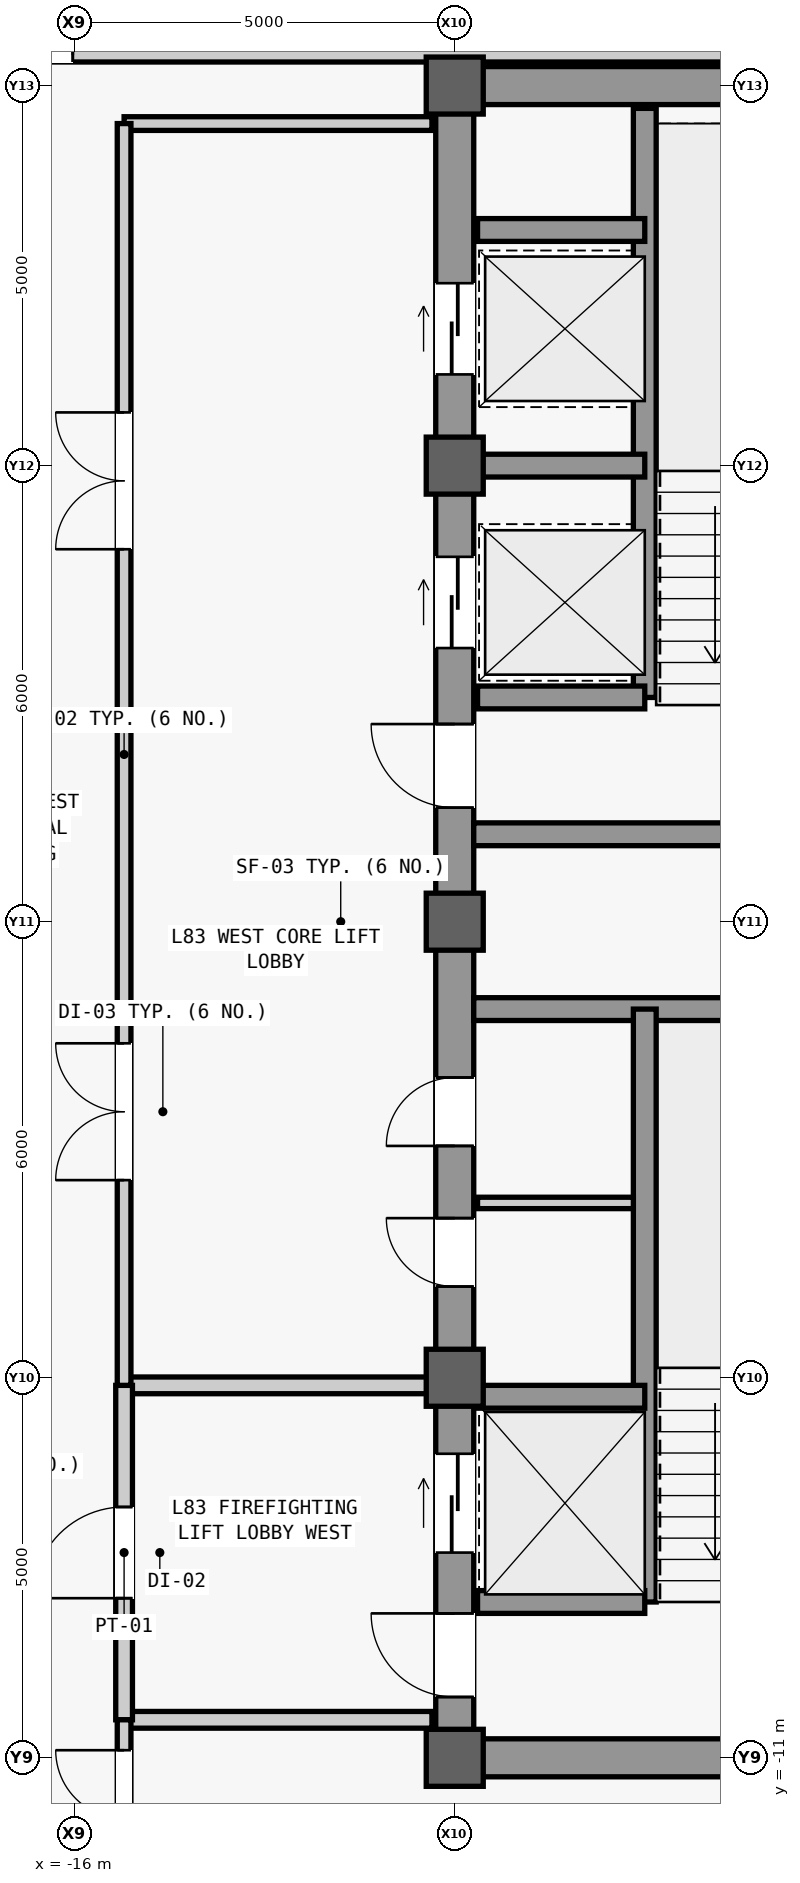
"""IFC4 building model, lengths in metres.
Left out: names, types, materials, properties, quantities, classifications, styles, units other than length and angle.
Written with IfcOpenShell. Run it as: python <this file> out.ifc"""

import sys

from ifc_helpers import new_model, si_unit, direction, frame, frame_2d, origin, origin_2d, place, context, subcontext, project, spatial, rectangle, extrude, source, transform, mapped, element, fill, save


model = new_model("IFC4")
c1 = context("Model", 3, precision=1e-05, world=origin(), true_north=direction((0.0, 1.0)))
c2 = subcontext(c1, "Body", "Model", "MODEL_VIEW")
j1 = project(units=[si_unit("LENGTHUNIT", "METRE"), si_unit("PLANEANGLEUNIT", "RADIAN")], contexts=[c1])
p1 = place(None, origin())
s1 = spatial("IfcSite", under=j1, at=p1, CompositionType="ELEMENT")
p2 = place(p1, origin())
s2 = spatial("IfcBuilding", under=s1, at=p2, CompositionType="ELEMENT")
p3 = place(p2, frame((0.0, 0.0, 350.3)))
s3 = spatial("IfcBuildingStorey", under=s2, at=p3, CompositionType="ELEMENT", Elevation=350.3)
m1 = source(origin(), c2, "Body", "SweptSolid", [
    extrude(rectangle(XDim=22.0, YDim=0.5, at=frame_2d((11.0, 0.0))), origin(), (0.0, 0.0, 1.0), 3.74),
])
p4 = place(p3, frame((-11.0, -11.0, 0.0), z_axis=(0.0, 0.0, 1.0), x_axis=(0.0, 1.0, 0.0)))
e1 = element("IfcWall", 1, at=p4, inside=s3, PredefinedType="SHEAR", context=c2, shape_type="MappedRepresentation", body=[
    mapped(m1, transform((0.0, 0.0, 0.0), scale=1.0)),
])
m2 = source(origin(), c2, "Body", "SweptSolid", [
    extrude(rectangle(XDim=1.1, YDim=2.2, at=frame_2d((0.55, 1.1))), frame((0.0, 0.26, 0.0), z_axis=(0.0, -1.0, 0.0), x_axis=(1.0, 0.0, 0.0)), (0.0, 0.0, 1.0), 0.52),
])
p5 = place(p4, frame((0.8, 0.0, 0.0)))
e2 = element("IfcOpeningElement", 2, at=p5, cuts=e1, PredefinedType="OPENING", context=c2, shape_type="MappedRepresentation", body=[
    mapped(m2, transform((0.0, 0.0, 0.0), scale=1.0)),
])
p6 = place(p4, frame((12.5, 0.0, 0.0)))
e3 = element("IfcOpeningElement", 3, at=p6, cuts=e1, PredefinedType="OPENING", context=c2, shape_type="MappedRepresentation", body=[
    mapped(m2, transform((0.0, 0.0, 0.0), scale=1.0)),
])
m3 = source(origin(), c2, "Body", "SweptSolid", [
    extrude(rectangle(XDim=0.9, YDim=2.15, at=frame_2d((0.45, 1.075))), frame((0.0, 0.26, 0.0), z_axis=(0.0, -1.0, 0.0), x_axis=(1.0, 0.0, 0.0)), (0.0, 0.0, 1.0), 0.52),
])
p7 = place(p4, frame((6.2, 0.0, 0.0)))
e4 = element("IfcOpeningElement", 4, at=p7, cuts=e1, PredefinedType="OPENING", context=c2, shape_type="MappedRepresentation", body=[
    mapped(m3, transform((0.0, 0.0, 0.0), scale=1.0)),
])
p8 = place(p4, frame((8.05, 0.0, 0.0)))
e5 = element("IfcOpeningElement", 5, at=p8, cuts=e1, PredefinedType="OPENING", context=c2, shape_type="MappedRepresentation", body=[
    mapped(m3, transform((0.0, 0.0, 0.0), scale=1.0)),
])
m4 = source(origin(), c2, "Body", "SweptSolid", [
    extrude(rectangle(XDim=1.2, YDim=2.3, at=frame_2d((0.6, 1.15))), frame((0.0, 0.26, 0.0), z_axis=(0.0, -1.0, 0.0), x_axis=(1.0, 0.0, 0.0)), (0.0, 0.0, 1.0), 0.52),
])
p9 = place(p4, frame((14.6, 0.0, 0.0)))
e6 = element("IfcOpeningElement", 6, at=p9, cuts=e1, PredefinedType="OPENING", context=c2, shape_type="MappedRepresentation", body=[
    mapped(m4, transform((0.0, 0.0, 0.0), scale=1.0)),
])
p10 = place(p4, frame((18.2, 0.0, 0.0)))
e7 = element("IfcOpeningElement", 7, at=p10, cuts=e1, PredefinedType="OPENING", context=c2, shape_type="MappedRepresentation", body=[
    mapped(m4, transform((0.0, 0.0, 0.0), scale=1.0)),
])
m5 = source(origin(), c2, "Body", "SweptSolid", [
    extrude(rectangle(XDim=1.3, YDim=2.3, at=frame_2d((0.65, 1.15))), frame((0.0, 0.26, 0.0), z_axis=(0.0, -1.0, 0.0), x_axis=(1.0, 0.0, 0.0)), (0.0, 0.0, 1.0), 0.52),
])
p11 = place(p4, frame((2.7, 0.0, 0.0)))
e8 = element("IfcOpeningElement", 8, at=p11, cuts=e1, PredefinedType="OPENING", context=c2, shape_type="MappedRepresentation", body=[
    mapped(m5, transform((0.0, 0.0, 0.0), scale=1.0)),
])
m6 = source(origin(), c2, "Body", "SweptSolid", [
    extrude(rectangle(XDim=5.9, YDim=0.5, at=frame_2d((2.95, 0.0))), origin(), (0.0, 0.0, 1.0), 3.74),
])
for number, where, z_axis, x_axis in (
    (9, (-10.75, -11.0, 0.0), (0.0, 0.0, 1.0), (1.0, 0.0, 0.0)),
    (10, (-10.75, 11.0, 0.0), (0.0, 0.0, 1.0), (1.0, 0.0, 0.0)),
):
    element("IfcWall", number, at=place(p3, frame(where, z_axis=z_axis, x_axis=x_axis)), inside=s3, PredefinedType="SHEAR", context=c2, shape_type="MappedRepresentation", body=[
        mapped(m6, transform((0.0, 0.0, 0.0), scale=1.0)),
    ])
m7 = source(origin(), c2, "Body", "SweptSolid", [
    extrude(rectangle(XDim=5.65, YDim=0.3, at=frame_2d((2.825, 0.0))), origin(), (0.0, 0.0, 1.0), 3.74),
])
for number, where, z_axis, x_axis in (
    (11, (-10.75, -1.15, 0.0), (0.0, 0.0, 1.0), (1.0, 0.0, 0.0)),
    (12, (-10.75, 1.15, 0.0), (0.0, 0.0, 1.0), (1.0, 0.0, 0.0)),
):
    element("IfcWall", number, at=place(p3, frame(where, z_axis=z_axis, x_axis=x_axis)), inside=s3, PredefinedType="SHEAR", context=c2, shape_type="MappedRepresentation", body=[
        mapped(m7, transform((0.0, 0.0, 0.0), scale=1.0)),
    ])
m8 = source(origin(), c2, "Body", "SweptSolid", [
    extrude(rectangle(XDim=0.75, YDim=0.75, at=origin_2d()), origin(), (0.0, 0.0, 1.0), 4.0),
])
for number, where, z_axis, x_axis in (
    (13, (-11.0, -11.0, 0.0), (0.0, 0.0, 1.0), (1.0, 0.0, 0.0)),
    (14, (-11.0, -6.0, 0.0), (0.0, 0.0, 1.0), (1.0, 0.0, 0.0)),
    (15, (-11.0, 0.0, 0.0), (0.0, 0.0, 1.0), (1.0, 0.0, 0.0)),
    (16, (-11.0, 6.0, 0.0), (0.0, 0.0, 1.0), (1.0, 0.0, 0.0)),
    (17, (-11.0, 11.0, 0.0), (0.0, 0.0, 1.0), (1.0, 0.0, 0.0)),
):
    element("IfcColumn", number, at=place(p3, frame(where, z_axis=z_axis, x_axis=x_axis)), inside=s3, PredefinedType="COLUMN", context=c2, shape_type="MappedRepresentation", body=[
        mapped(m8, transform((0.0, 0.0, 0.0), scale=1.0)),
    ])
m9 = source(origin(), c2, "Body", "SweptSolid", [
    extrude(rectangle(XDim=7.8, YDim=0.3, at=frame_2d((3.9, 0.0))), origin(), (0.0, 0.0, 1.0), 3.74),
])
p12 = place(p3, frame((-8.5, -8.95, 0.0), z_axis=(0.0, 0.0, 1.0), x_axis=(0.0, 1.0, 0.0)))
e18 = element("IfcWall", 18, at=p12, inside=s3, PredefinedType="SHEAR", context=c2, shape_type="MappedRepresentation", body=[
    mapped(m9, transform((0.0, 0.0, 0.0), scale=1.0)),
])
m10 = source(origin(), c2, "Body", "SweptSolid", [
    extrude(rectangle(XDim=2.2, YDim=0.3, at=frame_2d((1.1, 0.0))), origin(), (0.0, 0.0, 1.0), 3.74),
])
for number, where, z_axis, x_axis in (
    (19, (-10.7, -8.95, 0.0), (0.0, 0.0, 1.0), (1.0, 0.0, 0.0)),
    (20, (-10.7, -6.25, 0.0), (0.0, 0.0, 1.0), (1.0, 0.0, 0.0)),
):
    element("IfcWall", number, at=place(p3, frame(where, z_axis=z_axis, x_axis=x_axis)), inside=s3, PredefinedType="SHEAR", context=c2, shape_type="MappedRepresentation", body=[
        mapped(m10, transform((0.0, 0.0, 0.0), scale=1.0)),
    ])
m11 = source(origin(), c2, "Body", "SweptSolid", [
    extrude(rectangle(XDim=7.75, YDim=0.3, at=frame_2d((3.875, 0.0))), origin(), (0.0, 0.0, 1.0), 3.74),
])
p13 = place(p3, frame((-8.5, 2.95, 0.0), z_axis=(0.0, 0.0, 1.0), x_axis=(0.0, 1.0, 0.0)))
e21 = element("IfcWall", 21, at=p13, inside=s3, PredefinedType="SHEAR", context=c2, shape_type="MappedRepresentation", body=[
    mapped(m11, transform((0.0, 0.0, 0.0), scale=1.0)),
])
for number, where, z_axis, x_axis in (
    (22, (-10.7, 2.95, 0.0), (0.0, 0.0, 1.0), (1.0, 0.0, 0.0)),
    (23, (-10.7, 6.0, 0.0), (0.0, 0.0, 1.0), (1.0, 0.0, 0.0)),
    (24, (-10.7, 9.1, 0.0), (0.0, 0.0, 1.0), (1.0, 0.0, 0.0)),
):
    element("IfcWall", number, at=place(p3, frame(where, z_axis=z_axis, x_axis=x_axis)), inside=s3, PredefinedType="SHEAR", context=c2, shape_type="MappedRepresentation", body=[
        mapped(m10, transform((0.0, 0.0, 0.0), scale=1.0)),
    ])
m12 = source(origin(), c2, "Body", "SweptSolid", [
    extrude(rectangle(XDim=2.05, YDim=0.15, at=frame_2d((1.025, 0.0))), origin(), (0.0, 0.0, 1.0), 3.74),
])
p14 = place(p3, frame((-10.7, -3.7, 0.0), z_axis=(0.0, 0.0, 1.0), x_axis=(1.0, 0.0, 0.0)))
e25 = element("IfcWall", 25, at=p14, inside=s3, PredefinedType="PARTITIONING", context=c2, shape_type="MappedRepresentation", body=[
    mapped(m12, transform((0.0, 0.0, 0.0), scale=1.0)),
])
m13 = source(origin(), c2, "Body", "SweptSolid", [
    extrude(rectangle(XDim=4.05, YDim=0.22, at=frame_2d((2.025, 0.0))), origin(), (0.0, 0.0, 1.0), 3.74),
])
p15 = place(p3, frame((-15.35, -10.5, 0.0), z_axis=(0.0, 0.0, 1.0), x_axis=(1.0, 0.0, 0.0)))
e26 = element("IfcWall", 26, at=p15, inside=s3, PredefinedType="PARTITIONING", context=c2, shape_type="MappedRepresentation", body=[
    mapped(m13, transform((0.0, 0.0, 0.0), scale=1.0)),
])
m14 = source(origin(), c2, "Body", "SweptSolid", [
    extrude(rectangle(XDim=4.05, YDim=0.22, at=frame_2d((2.025, 0.0))), origin(), (0.0, 0.0, 1.0), 3.124),
])
p16 = place(p3, frame((-15.35, -6.1, 0.0), z_axis=(0.0, 0.0, 1.0), x_axis=(1.0, 0.0, 0.0)))
e27 = element("IfcWall", 27, at=p16, inside=s3, PredefinedType="PARTITIONING", context=c2, shape_type="MappedRepresentation", body=[
    mapped(m14, transform((0.0, 0.0, 0.0), scale=1.0)),
])
m15 = source(origin(), c2, "Body", "SweptSolid", [
    extrude(rectangle(XDim=4.4, YDim=0.22, at=frame_2d((2.2, 0.0))), origin(), (0.0, 0.0, 1.0), 3.74),
])
p17 = place(p3, frame((-15.35, -10.5, 0.0), z_axis=(0.0, 0.0, 1.0), x_axis=(0.0, 1.0, 0.0)))
e28 = element("IfcWall", 28, at=p17, inside=s3, PredefinedType="PARTITIONING", context=c2, shape_type="MappedRepresentation", body=[
    mapped(m15, transform((0.0, 0.0, 0.0), scale=1.0)),
])
m16 = source(origin(), c2, "Body", "SweptSolid", [
    extrude(rectangle(XDim=1.2, YDim=2.2, at=frame_2d((0.6, 1.1))), frame((0.0, 0.12, 0.0), z_axis=(0.0, -1.0, 0.0), x_axis=(1.0, 0.0, 0.0)), (0.0, 0.0, 1.0), 0.24),
])
p18 = place(p17, frame((1.6, 0.0, 0.0)))
e29 = element("IfcOpeningElement", 29, at=p18, cuts=e28, PredefinedType="OPENING", context=c2, shape_type="MappedRepresentation", body=[
    mapped(m16, transform((0.0, 0.0, 0.0), scale=1.0)),
])
m17 = source(origin(), c2, "Body", "SweptSolid", [
    extrude(rectangle(XDim=4.05, YDim=0.18, at=frame_2d((2.025, 0.0))), origin(), (0.0, 0.0, 1.0), 3.74),
])
p19 = place(p3, frame((-15.35, 10.5, 0.0), z_axis=(0.0, 0.0, 1.0), x_axis=(1.0, 0.0, 0.0)))
e30 = element("IfcWall", 30, at=p19, inside=s3, PredefinedType="PARTITIONING", context=c2, shape_type="MappedRepresentation", body=[
    mapped(m17, transform((0.0, 0.0, 0.0), scale=1.0)),
])
m18 = source(origin(), c2, "Body", "SweptSolid", [
    extrude(rectangle(XDim=16.6, YDim=0.18, at=frame_2d((8.3, 0.0))), origin(), (0.0, 0.0, 1.0), 3.74),
])
p20 = place(p3, frame((-15.35, -6.1, 0.0), z_axis=(0.0, 0.0, 1.0), x_axis=(0.0, 1.0, 0.0)))
e31 = element("IfcWall", 31, at=p20, inside=s3, PredefinedType="PARTITIONING", context=c2, shape_type="MappedRepresentation", body=[
    mapped(m18, transform((0.0, 0.0, 0.0), scale=1.0)),
])
m19 = source(origin(), c2, "Body", "SweptSolid", [
    extrude(rectangle(XDim=1.8, YDim=2.25, at=frame_2d((0.9, 1.125))), frame((0.0, 0.1, 0.0), z_axis=(0.0, -1.0, 0.0), x_axis=(1.0, 0.0, 0.0)), (0.0, 0.0, 1.0), 0.2),
])
p21 = place(p20, frame((2.7, 0.0, 0.0)))
e32 = element("IfcOpeningElement", 32, at=p21, cuts=e31, PredefinedType="OPENING", context=c2, shape_type="MappedRepresentation", body=[
    mapped(m19, transform((0.0, 0.0, 0.0), scale=1.0)),
])
p22 = place(p20, frame((11.0, 0.0, 0.0)))
e33 = element("IfcOpeningElement", 33, at=p22, cuts=e31, PredefinedType="OPENING", context=c2, shape_type="MappedRepresentation", body=[
    mapped(m19, transform((0.0, 0.0, 0.0), scale=1.0)),
])
m20 = source(origin(), c2, "Body", "SweptSolid", [
    extrude(rectangle(XDim=2.6, YDim=0.18, at=frame_2d((1.3, 0.0))), origin(), (0.0, 0.0, 1.0), 3.74),
])
p23 = place(p3, frame((-15.35, -13.1, 0.0), z_axis=(0.0, 0.0, 1.0), x_axis=(0.0, 1.0, 0.0)))
e34 = element("IfcWall", 34, at=p23, inside=s3, PredefinedType="PARTITIONING", context=c2, shape_type="MappedRepresentation", body=[
    mapped(m20, transform((0.0, 0.0, 0.0), scale=1.0)),
])
p24 = place(p23, frame((0.4, 0.0, 0.0)))
e35 = element("IfcOpeningElement", 35, at=p24, cuts=e34, PredefinedType="OPENING", context=c2, shape_type="MappedRepresentation", body=[
    mapped(m19, transform((0.0, 0.0, 0.0), scale=1.0)),
])
m21 = source(origin(), c2, "Body", "SweptSolid", [
    extrude(rectangle(XDim=12.7, YDim=0.18, at=frame_2d((6.35, 0.0))), origin(), (0.0, 0.0, 1.0), 2.79),
])
p25 = place(p3, frame((-17.75, 11.4, 0.0), z_axis=(0.0, 0.0, 1.0), x_axis=(1.0, 0.0, 0.0)))
e36 = element("IfcWall", 36, at=p25, inside=s3, PredefinedType="PARTITIONING", context=c2, shape_type="MappedRepresentation", body=[
    mapped(m21, transform((0.0, 0.0, 0.0), scale=1.0)),
])
m22 = source(origin(), c2, "Body", "SweptSolid", [
    extrude(rectangle(XDim=1.05, YDim=2.2, at=frame_2d((0.525, 1.1))), frame((0.0, 0.1, 0.0), z_axis=(0.0, -1.0, 0.0), x_axis=(1.0, 0.0, 0.0)), (0.0, 0.0, 1.0), 0.2),
])
p26 = place(p25, frame((0.675, 0.0, 0.0)))
e37 = element("IfcOpeningElement", 37, at=p26, cuts=e36, PredefinedType="OPENING", context=c2, shape_type="MappedRepresentation", body=[
    mapped(m22, transform((0.0, 0.0, 0.0), scale=1.0)),
])
m23 = source(origin(), c2, "Body", "SweptSolid", [
    extrude(rectangle(XDim=1.1, YDim=2.2, at=frame_2d((0.55, 1.1))), frame((0.0, 0.025, 0.0), z_axis=(0.0, -1.0, 0.0), x_axis=(1.0, 0.0, 0.0)), (0.0, 0.0, 1.0), 0.05),
])
p27 = place(p5, origin())
e38 = element("IfcDoor", 38, at=p27, inside=s3, OperationType="SINGLE_SWING_RIGHT", PredefinedType="DOOR", context=c2, shape_type="MappedRepresentation", body=[
    mapped(m23, transform((0.0, 0.0, 0.0), scale=1.0)),
])
fill(e2, e38)
p28 = place(p6, origin())
e39 = element("IfcDoor", 39, at=p28, inside=s3, OperationType="SINGLE_SWING_RIGHT", PredefinedType="DOOR", context=c2, shape_type="MappedRepresentation", body=[
    mapped(m23, transform((0.0, 0.0, 0.0), scale=1.0)),
])
fill(e3, e39)
m24 = source(origin(), c2, "Body", "SweptSolid", [
    extrude(rectangle(XDim=0.9, YDim=2.15, at=frame_2d((0.45, 1.075))), frame((0.0, 0.025, 0.0), z_axis=(0.0, -1.0, 0.0), x_axis=(1.0, 0.0, 0.0)), (0.0, 0.0, 1.0), 0.05),
])
p29 = place(p7, origin())
e40 = element("IfcDoor", 40, at=p29, inside=s3, OperationType="SINGLE_SWING_RIGHT", PredefinedType="DOOR", context=c2, shape_type="MappedRepresentation", body=[
    mapped(m24, transform((0.0, 0.0, 0.0), scale=1.0)),
])
fill(e4, e40)
p30 = place(p8, origin())
e41 = element("IfcDoor", 41, at=p30, inside=s3, OperationType="SINGLE_SWING_LEFT", PredefinedType="DOOR", context=c2, shape_type="MappedRepresentation", body=[
    mapped(m24, transform((0.0, 0.0, 0.0), scale=1.0)),
])
fill(e5, e41)
m25 = source(origin(), c2, "Body", "SweptSolid", [
    extrude(rectangle(XDim=1.2, YDim=2.2, at=frame_2d((0.6, 1.1))), frame((0.0, 0.025, 0.0), z_axis=(0.0, -1.0, 0.0), x_axis=(1.0, 0.0, 0.0)), (0.0, 0.0, 1.0), 0.05),
])
p31 = place(p18, origin())
e42 = element("IfcDoor", 42, at=p31, inside=s3, OperationType="SINGLE_SWING_LEFT", PredefinedType="DOOR", context=c2, shape_type="MappedRepresentation", body=[
    mapped(m25, transform((0.0, 0.0, 0.0), scale=1.0)),
])
fill(e29, e42)
m26 = source(origin(), c2, "Body", "SweptSolid", [
    extrude(rectangle(XDim=1.8, YDim=2.25, at=frame_2d((0.9, 1.125))), frame((0.0, 0.025, 0.0), z_axis=(0.0, -1.0, 0.0), x_axis=(1.0, 0.0, 0.0)), (0.0, 0.0, 1.0), 0.05),
])
p32 = place(p21, origin())
e43 = element("IfcDoor", 43, at=p32, inside=s3, OperationType="SINGLE_SWING_LEFT", PredefinedType="DOOR", context=c2, shape_type="MappedRepresentation", body=[
    mapped(m26, transform((0.0, 0.0, 0.0), scale=1.0)),
])
fill(e32, e43)
p33 = place(p22, origin())
e44 = element("IfcDoor", 44, at=p33, inside=s3, OperationType="SINGLE_SWING_RIGHT", PredefinedType="DOOR", context=c2, shape_type="MappedRepresentation", body=[
    mapped(m26, transform((0.0, 0.0, 0.0), scale=1.0)),
])
fill(e33, e44)
p34 = place(p24, origin())
e45 = element("IfcDoor", 45, at=p34, inside=s3, OperationType="DOUBLE_DOOR_SINGLE_SWING", PredefinedType="DOOR", context=c2, shape_type="MappedRepresentation", body=[
    mapped(m26, transform((0.0, 0.0, 0.0), scale=1.0)),
])
fill(e35, e45)
m27 = source(origin(), c2, "Body", "SweptSolid", [
    extrude(rectangle(XDim=1.05, YDim=2.2, at=frame_2d((0.525, 1.1))), frame((0.0, 0.025, 0.0), z_axis=(0.0, -1.0, 0.0), x_axis=(1.0, 0.0, 0.0)), (0.0, 0.0, 1.0), 0.05),
])
p35 = place(p26, origin())
e46 = element("IfcDoor", 46, at=p35, inside=s3, OperationType="SINGLE_SWING_RIGHT", PredefinedType="DOOR", context=c2, shape_type="MappedRepresentation", body=[
    mapped(m27, transform((0.0, 0.0, 0.0), scale=1.0)),
])
fill(e37, e46)
m28 = source(origin(), c2, "Body", "SweptSolid", [
    extrude(rectangle(XDim=1.2, YDim=2.3, at=frame_2d((0.6, 1.15))), frame((0.0, 0.025, 0.0), z_axis=(0.0, -1.0, 0.0), x_axis=(1.0, 0.0, 0.0)), (0.0, 0.0, 1.0), 0.05),
])
p36 = place(p9, origin())
e47 = element("IfcDoor", 47, at=p36, inside=s3, OperationType="SLIDING_TO_LEFT", PredefinedType="DOOR", context=c2, shape_type="MappedRepresentation", body=[
    mapped(m28, transform((0.0, 0.0, 0.0), scale=1.0)),
])
fill(e6, e47)
p37 = place(p10, origin())
e48 = element("IfcDoor", 48, at=p37, inside=s3, OperationType="SLIDING_TO_LEFT", PredefinedType="DOOR", context=c2, shape_type="MappedRepresentation", body=[
    mapped(m28, transform((0.0, 0.0, 0.0), scale=1.0)),
])
fill(e7, e48)
m29 = source(origin(), c2, "Body", "SweptSolid", [
    extrude(rectangle(XDim=1.3, YDim=2.3, at=frame_2d((0.65, 1.15))), frame((0.0, 0.025, 0.0), z_axis=(0.0, -1.0, 0.0), x_axis=(1.0, 0.0, 0.0)), (0.0, 0.0, 1.0), 0.05),
])
p38 = place(p11, origin())
e49 = element("IfcDoor", 49, at=p38, inside=s3, OperationType="SLIDING_TO_LEFT", PredefinedType="DOOR", context=c2, shape_type="MappedRepresentation", body=[
    mapped(m29, transform((0.0, 0.0, 0.0), scale=1.0)),
])
fill(e8, e49)
save(model, sys.argv[1])
